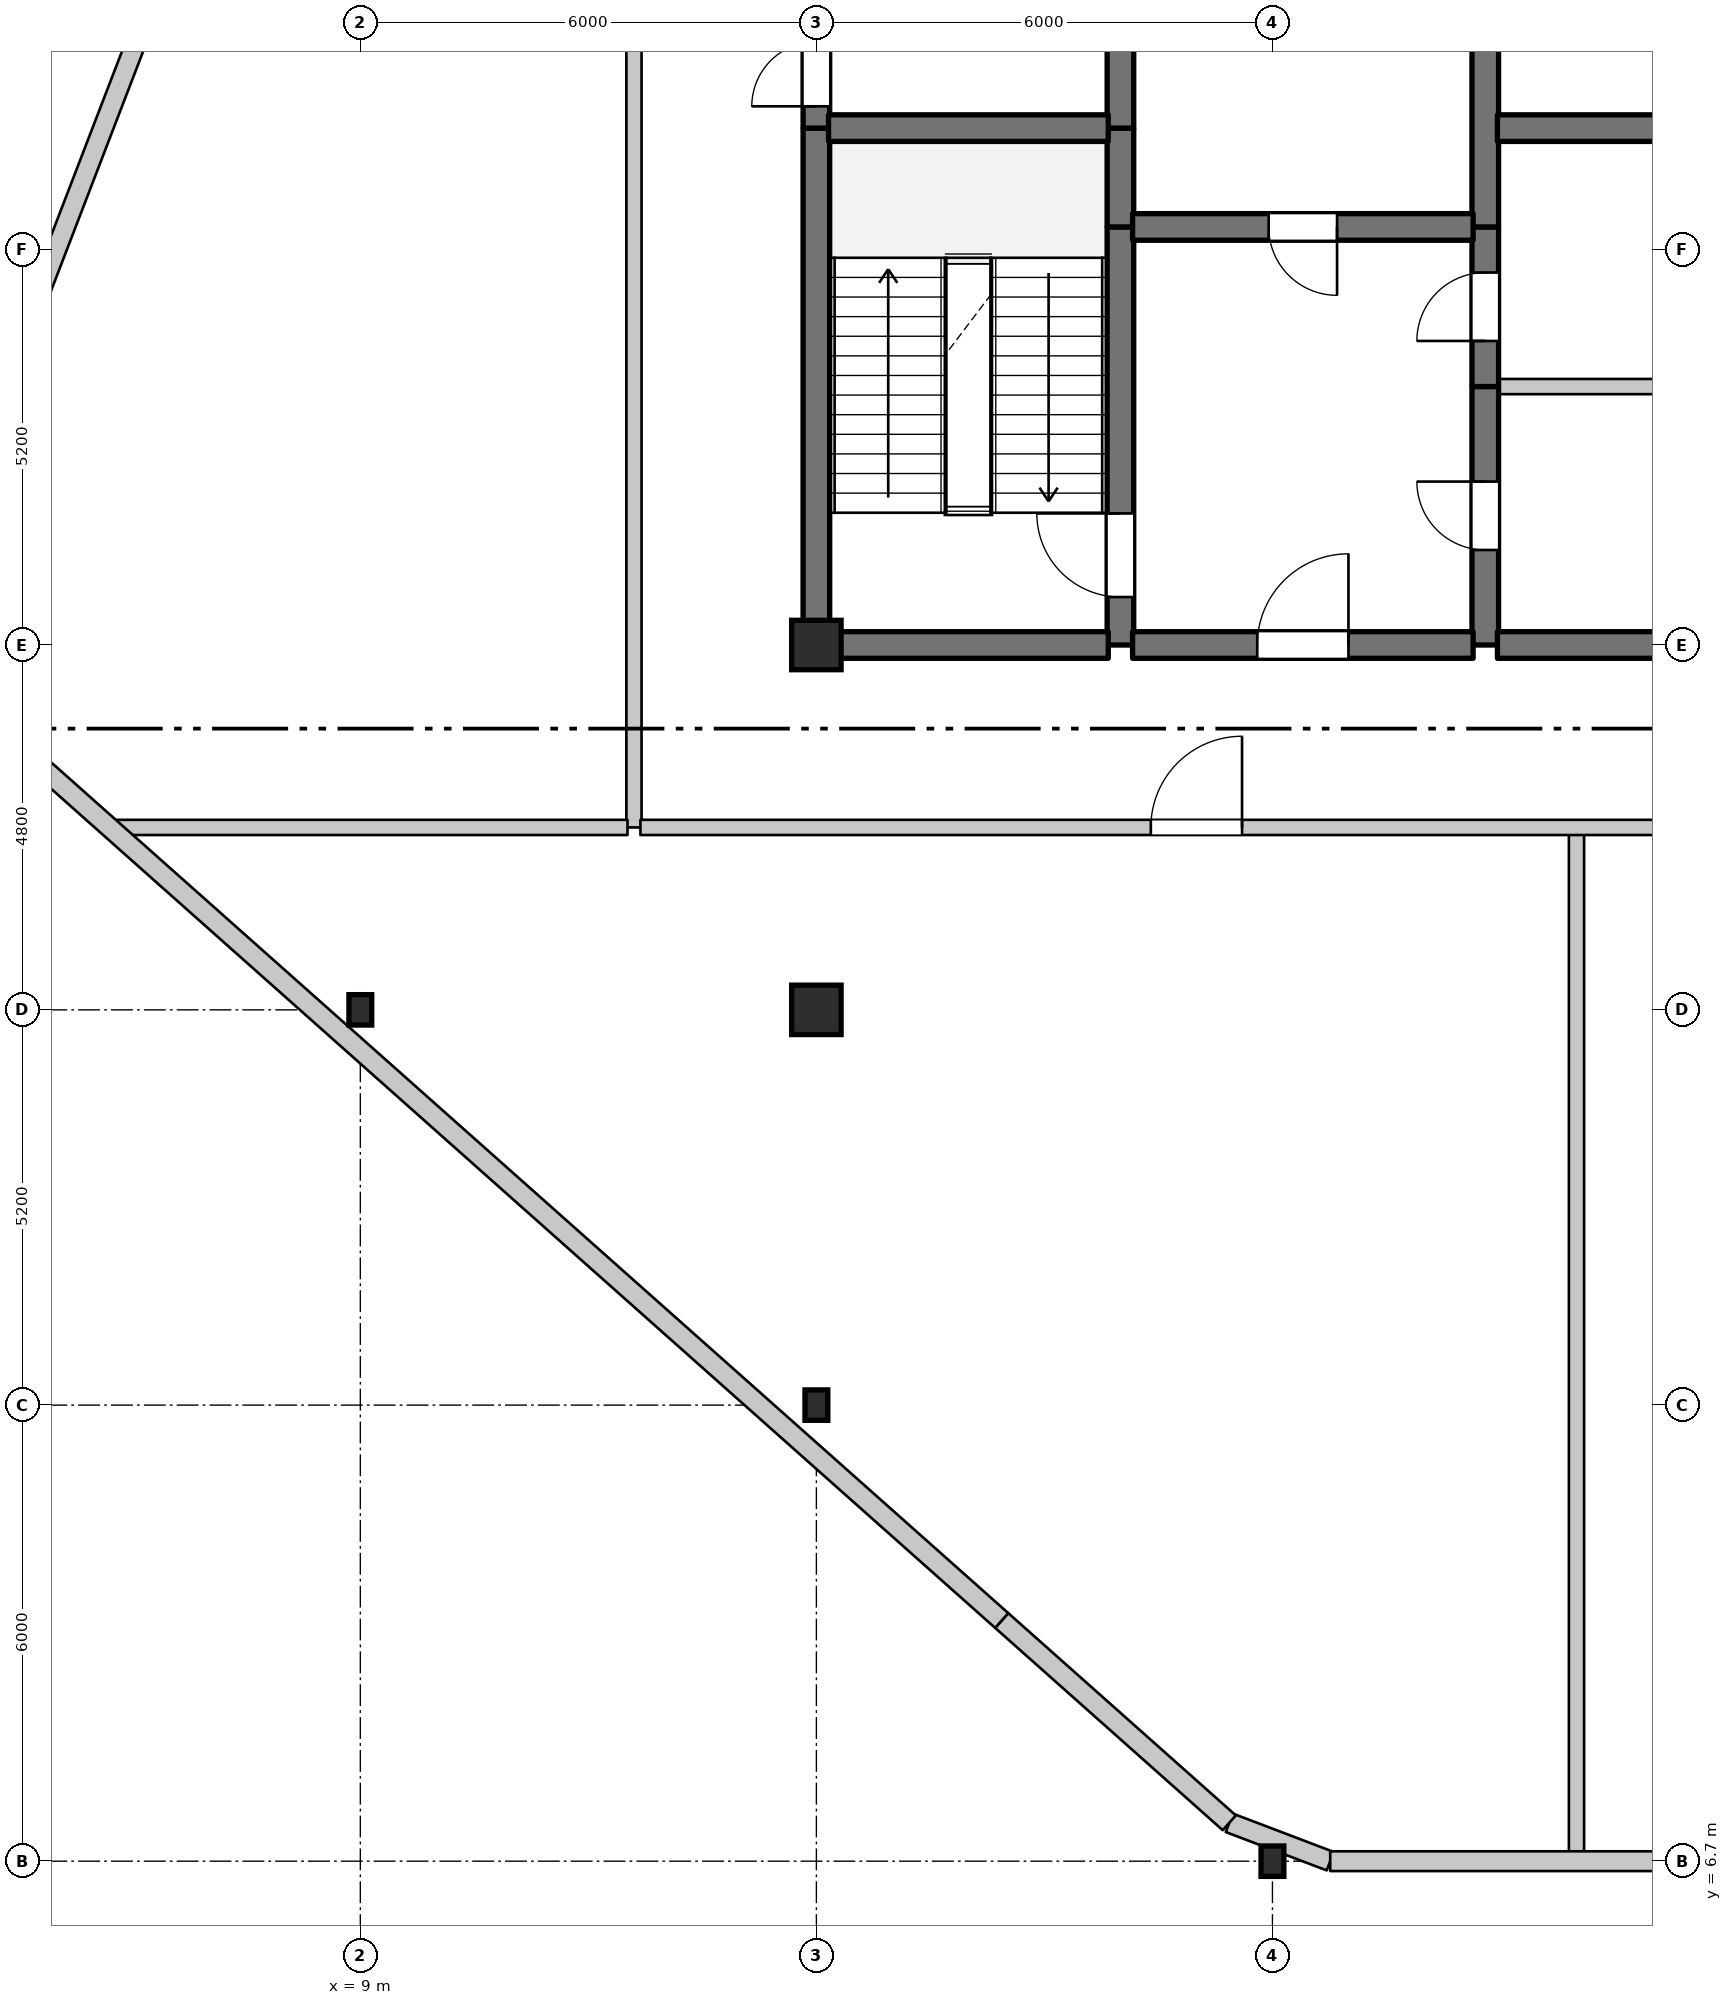
"""IFC4 building model, lengths in metres.
Left out: names, types, materials, properties, quantities, classifications, styles, units other than length and angle.
Written with IfcOpenShell. Run it as: python <this file> out.ifc"""

import sys

from ifc_helpers import new_model, si_unit, direction, frame, frame_2d, origin, origin_2d, place, context, subcontext, project, spatial, rectangle, i_section, extrude, element, fill, save


model = new_model("IFC4")
c1 = context("Model", 3, precision=1e-05, world=origin(), true_north=direction((0.0, 1.0)))
c2 = subcontext(c1, "Body", "Model", "MODEL_VIEW")
j1 = project(units=[si_unit("LENGTHUNIT", "METRE"), si_unit("PLANEANGLEUNIT", "RADIAN")], contexts=[c1])
p1 = place(None, origin())
s1 = spatial("IfcSite", under=j1, at=p1, CompositionType="ELEMENT")
p2 = place(p1, origin())
s2 = spatial("IfcBuilding", under=s1, at=p2, CompositionType="ELEMENT")
p3 = place(p2, frame((0.0, 0.0, 314.7)))
s3 = spatial("IfcBuildingStorey", under=s2, at=p3, CompositionType="ELEMENT", Elevation=314.7)
for number, where, z_axis, x_axis in (
    (1, (9.0, 17.9, 0.0), (0.0, 0.0, 1.0), (1.0, 0.0, 0.0)),
    (2, (15.0, 12.7, 0.0), (0.0, 0.0, 1.0), (1.0, 0.0, 0.0)),
):
    element("IfcColumn", number, at=place(p3, frame(where, z_axis=z_axis, x_axis=x_axis)), inside=s3, PredefinedType="COLUMN", context=c2, shape_type="SweptSolid", body=[
        extrude(i_section(OverallWidth=0.3, OverallDepth=0.4, WebThickness=0.013, FlangeThickness=0.024, FilletRadius=0.027, at=origin_2d()), origin(), (0.0, 0.0, 1.0), 5.3),
    ])
for number, where, z_axis, x_axis in (
    (3, (15.0, 17.9, 0.0), (0.0, 0.0, 1.0), (1.0, 0.0, 0.0)),
    (4, (15.0, 22.7, 0.0), (0.0, 0.0, 1.0), (1.0, 0.0, 0.0)),
):
    element("IfcColumn", number, at=place(p3, frame(where, z_axis=z_axis, x_axis=x_axis)), inside=s3, PredefinedType="COLUMN", context=c2, shape_type="SweptSolid", body=[
        extrude(rectangle(XDim=0.65, YDim=0.65, at=origin_2d()), origin(), (0.0, 0.0, 1.0), 5.3),
    ])
p4 = place(p3, frame((21.0, 6.7, 0.0), z_axis=(0.0, 0.0, 1.0), x_axis=(1.0, 0.0, 0.0)))
e5 = element("IfcColumn", 5, at=p4, inside=s3, PredefinedType="COLUMN", context=c2, shape_type="SweptSolid", body=[
    extrude(i_section(OverallWidth=0.3, OverallDepth=0.4, WebThickness=0.013, FlangeThickness=0.024, FilletRadius=0.027, at=origin_2d()), origin(), (0.0, 0.0, 1.0), 5.3),
])
p5 = place(p3, frame((3.497, 23.993, 0.0), z_axis=(0.0, 0.0, 1.0), x_axis=(0.358990281293, 0.93334129767, 0.0)))
e6 = element("IfcWall", 6, at=p5, inside=s3, PredefinedType="STANDARD", context=c2, shape_type="SweptSolid", body=[
    extrude(rectangle(XDim=30.669, YDim=0.26, at=frame_2d((15.335, 0.0))), origin(), (0.0, 0.0, 1.0), 4.99),
])
p6 = place(p3, frame((21.76, 6.7, 0.0), z_axis=(0.0, 0.0, 1.0), x_axis=(-0.934680848086, 0.355487991671, 0.0)))
e7 = element("IfcWall", 7, at=p6, inside=s3, PredefinedType="STANDARD", context=c2, shape_type="SweptSolid", body=[
    extrude(rectangle(XDim=1.421, YDim=0.26, at=frame_2d((0.71, 0.0))), origin(), (0.0, 0.0, 1.0), 4.99),
])
p7 = place(p3, frame((20.432, 7.205, 0.0), z_axis=(0.0, 0.0, 1.0), x_axis=(-0.747395867011, 0.664378971654, 0.0)))
e8 = element("IfcWall", 8, at=p7, inside=s3, PredefinedType="STANDARD", context=c2, shape_type="SweptSolid", body=[
    extrude(rectangle(XDim=4.005, YDim=0.26, at=frame_2d((2.003, 0.0))), origin(), (0.0, 0.0, 1.0), 4.65),
])
p8 = place(p3, frame((12.6, 20.3, 0.0), z_axis=(0.0, 0.0, 1.0), x_axis=(0.0, 1.0, 0.0)))
e9 = element("IfcWall", 9, at=p8, inside=s3, PredefinedType="STANDARD", context=c2, shape_type="SweptSolid", body=[
    extrude(rectangle(XDim=20.0, YDim=0.2, at=frame_2d((10.0, 0.0))), origin(), (0.0, 0.0, 1.0), 4.99),
])
p9 = place(p8, frame((13.175, 0.0, 0.0)))
e10 = element("IfcOpeningElement", 10, at=p9, cuts=e9, PredefinedType="OPENING", context=c2, shape_type="SweptSolid", body=[
    extrude(rectangle(XDim=1.2, YDim=2.2, at=frame_2d((0.6, 1.1))), frame((0.0, 0.11, 0.0), z_axis=(0.0, -1.0, 0.0), x_axis=(1.0, 0.0, 0.0)), (0.0, 0.0, 1.0), 0.22),
])
p10 = place(p3, frame((15.0, 22.7, 0.0), z_axis=(0.0, 0.0, 1.0), x_axis=(0.0, 1.0, 0.0)))
e11 = element("IfcWall", 11, at=p10, inside=s3, PredefinedType="SHEAR", context=c2, shape_type="SweptSolid", body=[
    extrude(rectangle(XDim=6.8, YDim=0.35, at=frame_2d((3.4, 0.0))), origin(), (0.0, 0.0, 1.0), 4.99),
])
p11 = place(p3, frame((15.0, 29.5, 0.0), z_axis=(0.0, 0.0, 1.0), x_axis=(0.0, 1.0, 0.0)))
e12 = element("IfcWall", 12, at=p11, inside=s3, PredefinedType="SHEAR", context=c2, shape_type="SweptSolid", body=[
    extrude(rectangle(XDim=1.6, YDim=0.35, at=frame_2d((0.8, 0.0))), origin(), (0.0, 0.0, 1.0), 4.99),
])
p12 = place(p11, frame((0.287, 0.0, 0.0)))
e13 = element("IfcOpeningElement", 13, at=p12, cuts=e12, PredefinedType="OPENING", context=c2, shape_type="SweptSolid", body=[
    extrude(rectangle(XDim=0.85, YDim=2.1, at=frame_2d((0.425, 1.05))), frame((0.0, 0.185, 0.0), z_axis=(0.0, -1.0, 0.0), x_axis=(1.0, 0.0, 0.0)), (0.0, 0.0, 1.0), 0.37),
])
p13 = place(p3, frame((19.0, 22.7, 0.0), z_axis=(0.0, 0.0, 1.0), x_axis=(0.0, 1.0, 0.0)))
e14 = element("IfcWall", 14, at=p13, inside=s3, PredefinedType="SHEAR", context=c2, shape_type="SweptSolid", body=[
    extrude(rectangle(XDim=5.5, YDim=0.35, at=frame_2d((2.75, 0.0))), origin(), (0.0, 0.0, 1.0), 4.99),
])
p14 = place(p13, frame((0.631, 0.0, 0.0)))
e15 = element("IfcOpeningElement", 15, at=p14, cuts=e14, PredefinedType="OPENING", context=c2, shape_type="SweptSolid", body=[
    extrude(rectangle(XDim=1.1, YDim=2.15, at=frame_2d((0.55, 1.075))), frame((0.0, 0.185, 0.0), z_axis=(0.0, -1.0, 0.0), x_axis=(1.0, 0.0, 0.0)), (0.0, 0.0, 1.0), 0.37),
])
p15 = place(p3, frame((19.0, 28.2, 0.0), z_axis=(0.0, 0.0, 1.0), x_axis=(0.0, 1.0, 0.0)))
e16 = element("IfcWall", 16, at=p15, inside=s3, PredefinedType="SHEAR", context=c2, shape_type="SweptSolid", body=[
    extrude(rectangle(XDim=1.3, YDim=0.35, at=frame_2d((0.65, 0.0))), origin(), (0.0, 0.0, 1.0), 4.99),
])
p16 = place(p3, frame((19.0, 29.5, 0.0), z_axis=(0.0, 0.0, 1.0), x_axis=(0.0, 1.0, 0.0)))
e17 = element("IfcWall", 17, at=p16, inside=s3, PredefinedType="SHEAR", context=c2, shape_type="SweptSolid", body=[
    extrude(rectangle(XDim=5.5, YDim=0.35, at=frame_2d((2.75, 0.0))), origin(), (0.0, 0.0, 1.0), 4.99),
])
p17 = place(p16, frame((2.025, 0.0, 0.0)))
e18 = element("IfcOpeningElement", 18, at=p17, cuts=e17, PredefinedType="OPENING", context=c2, shape_type="SweptSolid", body=[
    extrude(rectangle(XDim=1.1, YDim=2.15, at=frame_2d((0.55, 1.075))), frame((0.0, 0.185, 0.0), z_axis=(0.0, -1.0, 0.0), x_axis=(1.0, 0.0, 0.0)), (0.0, 0.0, 1.0), 0.37),
])
p18 = place(p3, frame((23.8, 22.7, 0.0), z_axis=(0.0, 0.0, 1.0), x_axis=(0.0, 1.0, 0.0)))
e19 = element("IfcWall", 19, at=p18, inside=s3, PredefinedType="SHEAR", context=c2, shape_type="SweptSolid", body=[
    extrude(rectangle(XDim=3.4, YDim=0.35, at=frame_2d((1.7, 0.0))), origin(), (0.0, 0.0, 1.0), 4.99),
])
p19 = place(p18, frame((1.25, 0.0, 0.0)))
e20 = element("IfcOpeningElement", 20, at=p19, cuts=e19, PredefinedType="OPENING", context=c2, shape_type="SweptSolid", body=[
    extrude(rectangle(XDim=0.9, YDim=2.15, at=frame_2d((0.45, 1.075))), frame((0.0, 0.185, 0.0), z_axis=(0.0, -1.0, 0.0), x_axis=(1.0, 0.0, 0.0)), (0.0, 0.0, 1.0), 0.37),
])
p20 = place(p3, frame((23.8, 26.1, 0.0), z_axis=(0.0, 0.0, 1.0), x_axis=(0.0, 1.0, 0.0)))
e21 = element("IfcWall", 21, at=p20, inside=s3, PredefinedType="SHEAR", context=c2, shape_type="SweptSolid", body=[
    extrude(rectangle(XDim=2.1, YDim=0.35, at=frame_2d((1.05, 0.0))), origin(), (0.0, 0.0, 1.0), 4.99),
])
p21 = place(p20, frame((0.6, 0.0, 0.0)))
e22 = element("IfcOpeningElement", 22, at=p21, cuts=e21, PredefinedType="OPENING", context=c2, shape_type="SweptSolid", body=[
    extrude(rectangle(XDim=0.9, YDim=2.15, at=frame_2d((0.45, 1.075))), frame((0.0, 0.185, 0.0), z_axis=(0.0, -1.0, 0.0), x_axis=(1.0, 0.0, 0.0)), (0.0, 0.0, 1.0), 0.37),
])
p22 = place(p3, frame((23.8, 28.2, 0.0), z_axis=(0.0, 0.0, 1.0), x_axis=(0.0, 1.0, 0.0)))
e23 = element("IfcWall", 23, at=p22, inside=s3, PredefinedType="SHEAR", context=c2, shape_type="SweptSolid", body=[
    extrude(rectangle(XDim=2.6, YDim=0.35, at=frame_2d((1.3, 0.0))), origin(), (0.0, 0.0, 1.0), 4.99),
])
p23 = place(p3, frame((25.0, 6.71, 0.0), z_axis=(0.0, 0.0, 1.0), x_axis=(0.0, 1.0, 0.0)))
e24 = element("IfcWall", 24, at=p23, inside=s3, PredefinedType="STANDARD", context=c2, shape_type="SweptSolid", body=[
    extrude(rectangle(XDim=13.59, YDim=0.2, at=frame_2d((6.795, 0.0))), origin(), (0.0, 0.0, 1.0), 4.99),
])
p24 = place(p3, frame((5.71, 20.3, 0.0), z_axis=(0.0, 0.0, 1.0), x_axis=(1.0, 0.0, 0.0)))
e25 = element("IfcWall", 25, at=p24, inside=s3, PredefinedType="STANDARD", context=c2, shape_type="SweptSolid", body=[
    extrude(rectangle(XDim=6.805, YDim=0.2, at=frame_2d((3.402, 0.0))), origin(), (0.0, 0.0, 1.0), 4.99),
])
p25 = place(p3, frame((12.685, 20.3, 0.0), z_axis=(0.0, 0.0, 1.0), x_axis=(1.0, 0.0, 0.0)))
e26 = element("IfcWall", 26, at=p25, inside=s3, PredefinedType="STANDARD", context=c2, shape_type="SweptSolid", body=[
    extrude(rectangle(XDim=20.23, YDim=0.2, at=frame_2d((10.115, 0.0))), origin(), (0.0, 0.0, 1.0), 4.99),
])
p26 = place(p25, frame((6.715, 0.0, 0.0)))
e27 = element("IfcOpeningElement", 27, at=p26, cuts=e26, PredefinedType="OPENING", context=c2, shape_type="SweptSolid", body=[
    extrude(rectangle(XDim=1.2, YDim=2.2, at=frame_2d((0.6, 1.1))), frame((0.0, 0.11, 0.0), z_axis=(0.0, -1.0, 0.0), x_axis=(1.0, 0.0, 0.0)), (0.0, 0.0, 1.0), 0.22),
])
p27 = place(p25, frame((16.14, 0.0, 0.0)))
e28 = element("IfcOpeningElement", 28, at=p27, cuts=e26, PredefinedType="OPENING", context=c2, shape_type="SweptSolid", body=[
    extrude(rectangle(XDim=1.2, YDim=2.2, at=frame_2d((0.6, 1.1))), frame((0.0, 0.11, 0.0), z_axis=(0.0, -1.0, 0.0), x_axis=(1.0, 0.0, 0.0)), (0.0, 0.0, 1.0), 0.22),
])
p28 = place(p3, frame((15.16, 22.7, 0.0), z_axis=(0.0, 0.0, 1.0), x_axis=(1.0, 0.0, 0.0)))
e29 = element("IfcWall", 29, at=p28, inside=s3, PredefinedType="SHEAR", context=c2, shape_type="SweptSolid", body=[
    extrude(rectangle(XDim=3.68, YDim=0.35, at=frame_2d((1.84, 0.0))), origin(), (0.0, 0.0, 1.0), 4.99),
])
p29 = place(p3, frame((19.16, 22.7, 0.0), z_axis=(0.0, 0.0, 1.0), x_axis=(1.0, 0.0, 0.0)))
e30 = element("IfcWall", 30, at=p29, inside=s3, PredefinedType="SHEAR", context=c2, shape_type="SweptSolid", body=[
    extrude(rectangle(XDim=4.48, YDim=0.35, at=frame_2d((2.24, 0.0))), origin(), (0.0, 0.0, 1.0), 4.99),
])
p30 = place(p29, frame((1.64, 0.0, 0.0)))
e31 = element("IfcOpeningElement", 31, at=p30, cuts=e30, PredefinedType="OPENING", context=c2, shape_type="SweptSolid", body=[
    extrude(rectangle(XDim=1.2, YDim=2.2, at=frame_2d((0.6, 1.1))), frame((0.0, 0.185, 0.0), z_axis=(0.0, -1.0, 0.0), x_axis=(1.0, 0.0, 0.0)), (0.0, 0.0, 1.0), 0.37),
])
p31 = place(p3, frame((23.96, 22.7, 0.0), z_axis=(0.0, 0.0, 1.0), x_axis=(1.0, 0.0, 0.0)))
e32 = element("IfcWall", 32, at=p31, inside=s3, PredefinedType="SHEAR", context=c2, shape_type="SweptSolid", body=[
    extrude(rectangle(XDim=3.18, YDim=0.35, at=frame_2d((1.59, 0.0))), origin(), (0.0, 0.0, 1.0), 4.99),
])
p32 = place(p3, frame((23.96, 26.1, 0.0), z_axis=(0.0, 0.0, 1.0), x_axis=(1.0, 0.0, 0.0)))
e33 = element("IfcWall", 33, at=p32, inside=s3, PredefinedType="STANDARD", context=c2, shape_type="SweptSolid", body=[
    extrude(rectangle(XDim=3.18, YDim=0.2, at=frame_2d((1.59, 0.0))), origin(), (0.0, 0.0, 1.0), 4.99),
])
p33 = place(p3, frame((19.16, 28.2, 0.0), z_axis=(0.0, 0.0, 1.0), x_axis=(1.0, 0.0, 0.0)))
e34 = element("IfcWall", 34, at=p33, inside=s3, PredefinedType="SHEAR", context=c2, shape_type="SweptSolid", body=[
    extrude(rectangle(XDim=4.48, YDim=0.35, at=frame_2d((2.24, 0.0))), origin(), (0.0, 0.0, 1.0), 4.99),
])
p34 = place(p33, frame((1.79, 0.0, 0.0)))
e35 = element("IfcOpeningElement", 35, at=p34, cuts=e34, PredefinedType="OPENING", context=c2, shape_type="SweptSolid", body=[
    extrude(rectangle(XDim=0.9, YDim=2.15, at=frame_2d((0.45, 1.075))), frame((0.0, 0.185, 0.0), z_axis=(0.0, -1.0, 0.0), x_axis=(1.0, 0.0, 0.0)), (0.0, 0.0, 1.0), 0.37),
])
p35 = place(p3, frame((15.16, 29.5, 0.0), z_axis=(0.0, 0.0, 1.0), x_axis=(1.0, 0.0, 0.0)))
e36 = element("IfcWall", 36, at=p35, inside=s3, PredefinedType="SHEAR", context=c2, shape_type="SweptSolid", body=[
    extrude(rectangle(XDim=3.68, YDim=0.35, at=frame_2d((1.84, 0.0))), origin(), (0.0, 0.0, 1.0), 4.99),
])
p36 = place(p3, frame((23.96, 29.5, 0.0), z_axis=(0.0, 0.0, 1.0), x_axis=(1.0, 0.0, 0.0)))
e37 = element("IfcWall", 37, at=p36, inside=s3, PredefinedType="SHEAR", context=c2, shape_type="SweptSolid", body=[
    extrude(rectangle(XDim=3.18, YDim=0.35, at=frame_2d((1.59, 0.0))), origin(), (0.0, 0.0, 1.0), 4.99),
])
p37 = place(p3, frame((39.0, 6.7, 0.0), z_axis=(0.0, 0.0, 1.0), x_axis=(-1.0, 0.0, 0.0)))
e38 = element("IfcWall", 38, at=p37, inside=s3, PredefinedType="STANDARD", context=c2, shape_type="SweptSolid", body=[
    extrude(rectangle(XDim=17.24, YDim=0.26, at=frame_2d((8.62, 0.0))), origin(), (0.0, 0.0, 1.0), 4.64),
])
p38 = place(p3, frame((17.438, 9.866, 0.0), z_axis=(0.0, 0.0, 1.0), x_axis=(-0.747416078768, 0.664356233657, 0.0)))
e39 = element("IfcWall", 39, at=p38, inside=s3, PredefinedType="STANDARD", context=c2, shape_type="SweptSolid", body=[
    extrude(rectangle(XDim=17.933, YDim=0.26, at=frame_2d((8.966, 0.0))), origin(), (0.0, 0.0, 1.0), 4.99),
])
p39 = place(p12, origin())
e40 = element("IfcDoor", 40, at=p39, inside=s3, OperationType="SINGLE_SWING_LEFT", PredefinedType="DOOR", context=c2, shape_type="SweptSolid", body=[
    extrude(rectangle(XDim=0.85, YDim=2.1, at=frame_2d((0.425, 1.05))), frame((0.0, 0.025, 0.0), z_axis=(0.0, -1.0, 0.0), x_axis=(1.0, 0.0, 0.0)), (0.0, 0.0, 1.0), 0.05),
])
fill(e13, e40)
p40 = place(p14, origin())
e41 = element("IfcDoor", 41, at=p40, inside=s3, OperationType="SINGLE_SWING_RIGHT", PredefinedType="DOOR", context=c2, shape_type="SweptSolid", body=[
    extrude(rectangle(XDim=1.1, YDim=2.15, at=frame_2d((0.55, 1.075))), frame((0.0, 0.025, 0.0), z_axis=(0.0, -1.0, 0.0), x_axis=(1.0, 0.0, 0.0)), (0.0, 0.0, 1.0), 0.05),
])
fill(e15, e41)
p41 = place(p19, origin())
e42 = element("IfcDoor", 42, at=p41, inside=s3, OperationType="SINGLE_SWING_RIGHT", PredefinedType="DOOR", context=c2, shape_type="SweptSolid", body=[
    extrude(rectangle(XDim=0.9, YDim=2.15, at=frame_2d((0.45, 1.075))), frame((0.0, 0.025, 0.0), z_axis=(0.0, -1.0, 0.0), x_axis=(1.0, 0.0, 0.0)), (0.0, 0.0, 1.0), 0.05),
])
fill(e20, e42)
p42 = place(p21, origin())
e43 = element("IfcDoor", 43, at=p42, inside=s3, OperationType="SINGLE_SWING_LEFT", PredefinedType="DOOR", context=c2, shape_type="SweptSolid", body=[
    extrude(rectangle(XDim=0.9, YDim=2.15, at=frame_2d((0.45, 1.075))), frame((0.0, 0.025, 0.0), z_axis=(0.0, -1.0, 0.0), x_axis=(1.0, 0.0, 0.0)), (0.0, 0.0, 1.0), 0.05),
])
fill(e22, e43)
p43 = place(p26, origin())
e44 = element("IfcDoor", 44, at=p43, inside=s3, OperationType="SINGLE_SWING_RIGHT", PredefinedType="DOOR", context=c2, shape_type="SweptSolid", body=[
    extrude(rectangle(XDim=1.2, YDim=2.2, at=frame_2d((0.6, 1.1))), frame((0.0, 0.025, 0.0), z_axis=(0.0, -1.0, 0.0), x_axis=(1.0, 0.0, 0.0)), (0.0, 0.0, 1.0), 0.05),
])
fill(e27, e44)
p44 = place(p30, origin())
e45 = element("IfcDoor", 45, at=p44, inside=s3, OperationType="SINGLE_SWING_RIGHT", PredefinedType="DOOR", context=c2, shape_type="SweptSolid", body=[
    extrude(rectangle(XDim=1.2, YDim=2.2, at=frame_2d((0.6, 1.1))), frame((0.0, 0.025, 0.0), z_axis=(0.0, -1.0, 0.0), x_axis=(1.0, 0.0, 0.0)), (0.0, 0.0, 1.0), 0.05),
])
fill(e31, e45)
p45 = place(p34, frame((0.9, 0.0, 0.0), z_axis=(0.0, 0.0, 1.0), x_axis=(-1.0, 0.0, 0.0)))
e46 = element("IfcDoor", 46, at=p45, inside=s3, OperationType="SINGLE_SWING_RIGHT", PredefinedType="DOOR", context=c2, shape_type="SweptSolid", body=[
    extrude(rectangle(XDim=0.9, YDim=2.15, at=frame_2d((0.45, 1.075))), frame((0.0, 0.025, 0.0), z_axis=(0.0, -1.0, 0.0), x_axis=(1.0, 0.0, 0.0)), (0.0, 0.0, 1.0), 0.05),
])
fill(e35, e46)
save(model, sys.argv[1])
